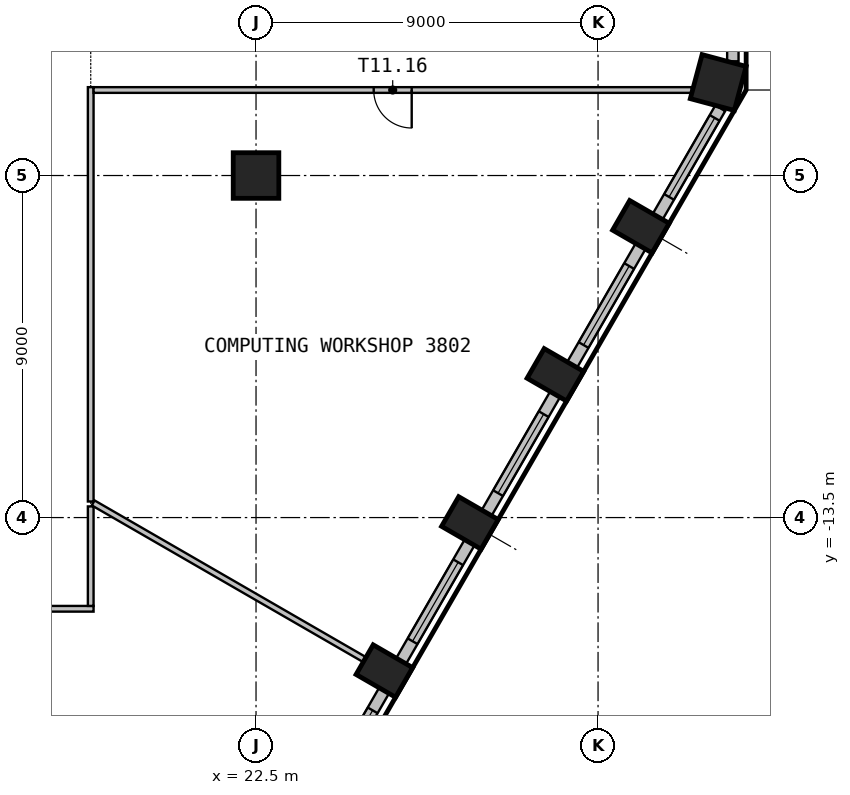
"""IFC4 building model, lengths in metres.
Left out: names, types, materials, properties, quantities, classifications, styles, units other than length and angle.
Written with IfcOpenShell. Run it as: python <this file> out.ifc"""

import sys

from ifc_helpers import new_model, si_unit, direction, frame, frame_2d, origin, origin_2d, place, context, subcontext, project, spatial, rectangle, circle, extrude, element, fill, save


model = new_model("IFC4")
c1 = context("Model", 3, precision=1e-05, world=origin(), true_north=direction((0.0, 1.0)))
c2 = subcontext(c1, "Body", "Model", "MODEL_VIEW")
j1 = project(units=[si_unit("LENGTHUNIT", "METRE"), si_unit("PLANEANGLEUNIT", "RADIAN")], contexts=[c1])
p1 = place(None, origin())
s1 = spatial("IfcSite", under=j1, at=p1, CompositionType="ELEMENT")
p2 = place(p1, origin())
s2 = spatial("IfcBuilding", under=s1, at=p2, CompositionType="ELEMENT")
p3 = place(p2, frame((0.0, 0.0, 156.0)))
s3 = spatial("IfcBuildingStorey", under=s2, at=p3, CompositionType="ELEMENT", Elevation=156.0)
for number, where, z_axis, x_axis in (
    (1, (25.877, -17.539, 0.0), (0.0, 0.0, 1.0), (0.5, 0.866, 0.0)),
    (2, (28.127, -13.641, 0.0), (0.0, 0.0, 1.0), (0.5, 0.866, 0.0)),
    (3, (30.377, -9.744, 0.0), (0.0, 0.0, 1.0), (0.5, 0.866, 0.0)),
    (4, (32.627, -5.847, 0.0), (0.0, 0.0, 1.0), (0.5, 0.866, 0.0)),
):
    element("IfcColumn", number, at=place(p3, frame(where, z_axis=z_axis, x_axis=x_axis)), inside=s3, PredefinedType="COLUMN", context=c2, shape_type="SweptSolid", body=[
        extrude(rectangle(XDim=0.9, YDim=1.2, at=origin_2d()), origin(), (0.0, 0.0, 1.0), 3.575),
    ])
p4 = place(p3, frame((34.662, -2.053, 0.0), z_axis=(0.0, 0.0, 1.0), x_axis=(0.258819045103, 0.965925826289, 0.0)))
e5 = element("IfcColumn", 5, at=p4, inside=s3, PredefinedType="COLUMN", context=c2, shape_type="SweptSolid", body=[
    extrude(rectangle(XDim=1.2, YDim=1.2, at=origin_2d()), origin(), (0.0, 0.0, 1.0), 3.575),
])
p5 = place(p3, frame((22.5, -4.5, 0.0), z_axis=(0.0, 0.0, 1.0), x_axis=(1.0, 0.0, 0.0)))
e6 = element("IfcColumn", 6, at=p5, inside=s3, PredefinedType="COLUMN", context=c2, shape_type="SweptSolid", body=[
    extrude(circle(Radius=0.6, at=origin_2d()), origin(), (0.0, 0.0, 1.0), 3.575),
])
p6 = place(p3, frame((24.069, -21.17, 0.0), z_axis=(0.0, 0.0, 1.0), x_axis=(0.500027802648, 0.866009351323, 0.0)))
e7 = element("IfcWall", 7, at=p6, inside=s3, PredefinedType="SOLIDWALL", context=c2, shape_type="SweptSolid", body=[
    extrude(rectangle(XDim=3.599, YDim=0.3, at=frame_2d((1.799, 0.0))), origin(), (0.0, 0.0, 1.0), 3.575),
])
p7 = place(p6, frame((0.6, 0.0, 0.9)))
e8 = element("IfcOpeningElement", 8, at=p7, cuts=e7, PredefinedType="OPENING", context=c2, shape_type="SweptSolid", body=[
    extrude(rectangle(XDim=2.4, YDim=2.1, at=frame_2d((1.2, 1.05))), frame((0.0, 0.16, 0.0), z_axis=(0.0, -1.0, 0.0), x_axis=(1.0, 0.0, 0.0)), (0.0, 0.0, 1.0), 0.32),
])
p8 = place(p3, frame((26.319, -17.273, 0.0), z_axis=(0.0, 0.0, 1.0), x_axis=(0.500027802648, 0.866009351323, 0.0)))
e9 = element("IfcWall", 9, at=p8, inside=s3, PredefinedType="SOLIDWALL", context=c2, shape_type="SweptSolid", body=[
    extrude(rectangle(XDim=3.599, YDim=0.3, at=frame_2d((1.799, 0.0))), origin(), (0.0, 0.0, 1.0), 3.575),
])
p9 = place(p8, frame((0.6, 0.0, 0.9)))
e10 = element("IfcOpeningElement", 10, at=p9, cuts=e9, PredefinedType="OPENING", context=c2, shape_type="SweptSolid", body=[
    extrude(rectangle(XDim=2.4, YDim=2.1, at=frame_2d((1.2, 1.05))), frame((0.0, 0.16, 0.0), z_axis=(0.0, -1.0, 0.0), x_axis=(1.0, 0.0, 0.0)), (0.0, 0.0, 1.0), 0.32),
])
p10 = place(p3, frame((28.569, -13.376, 0.0), z_axis=(0.0, 0.0, 1.0), x_axis=(0.500027802648, 0.866009351323, 0.0)))
e11 = element("IfcWall", 11, at=p10, inside=s3, PredefinedType="SOLIDWALL", context=c2, shape_type="SweptSolid", body=[
    extrude(rectangle(XDim=3.599, YDim=0.3, at=frame_2d((1.799, 0.0))), origin(), (0.0, 0.0, 1.0), 3.575),
])
p11 = place(p10, frame((0.6, 0.0, 0.9)))
e12 = element("IfcOpeningElement", 12, at=p11, cuts=e11, PredefinedType="OPENING", context=c2, shape_type="SweptSolid", body=[
    extrude(rectangle(XDim=2.4, YDim=2.1, at=frame_2d((1.2, 1.05))), frame((0.0, 0.16, 0.0), z_axis=(0.0, -1.0, 0.0), x_axis=(1.0, 0.0, 0.0)), (0.0, 0.0, 1.0), 0.32),
])
p12 = place(p3, frame((30.819, -9.479, 0.0), z_axis=(0.0, 0.0, 1.0), x_axis=(0.500027802648, 0.866009351323, 0.0)))
e13 = element("IfcWall", 13, at=p12, inside=s3, PredefinedType="SOLIDWALL", context=c2, shape_type="SweptSolid", body=[
    extrude(rectangle(XDim=3.599, YDim=0.3, at=frame_2d((1.799, 0.0))), origin(), (0.0, 0.0, 1.0), 3.575),
])
p13 = place(p12, frame((0.6, 0.0, 0.9)))
e14 = element("IfcOpeningElement", 14, at=p13, cuts=e13, PredefinedType="OPENING", context=c2, shape_type="SweptSolid", body=[
    extrude(rectangle(XDim=2.4, YDim=2.1, at=frame_2d((1.2, 1.05))), frame((0.0, 0.16, 0.0), z_axis=(0.0, -1.0, 0.0), x_axis=(1.0, 0.0, 0.0)), (0.0, 0.0, 1.0), 0.32),
])
p14 = place(p3, frame((33.069, -5.582, 0.0), z_axis=(0.0, 0.0, 1.0), x_axis=(0.499981217486, 0.866036247602, 0.0)))
e15 = element("IfcWall", 15, at=p14, inside=s3, PredefinedType="SOLIDWALL", context=c2, shape_type="SweptSolid", body=[
    extrude(rectangle(XDim=3.294, YDim=0.3, at=frame_2d((1.647, 0.0))), origin(), (0.0, 0.0, 1.0), 3.575),
])
p15 = place(p14, frame((0.6, 0.0, 0.9)))
e16 = element("IfcOpeningElement", 16, at=p15, cuts=e15, PredefinedType="OPENING", context=c2, shape_type="SweptSolid", body=[
    extrude(rectangle(XDim=2.4, YDim=2.1, at=frame_2d((1.2, 1.05))), frame((0.0, 0.16, 0.0), z_axis=(0.0, -1.0, 0.0), x_axis=(1.0, 0.0, 0.0)), (0.0, 0.0, 1.0), 0.32),
])
p16 = place(p3, frame((35.047, -1.495, 0.0), z_axis=(0.0, 0.0, 1.0), x_axis=(0.0, 1.0, 0.0)))
e17 = element("IfcWall", 17, at=p16, inside=s3, PredefinedType="SOLIDWALL", context=c2, shape_type="SweptSolid", body=[
    extrude(rectangle(XDim=2.989, YDim=0.3, at=frame_2d((1.495, 0.0))), origin(), (0.0, 0.0, 1.0), 3.575),
])
p17 = place(p16, frame((0.295, 0.0, 0.9)))
e18 = element("IfcOpeningElement", 18, at=p17, cuts=e17, PredefinedType="OPENING", context=c2, shape_type="SweptSolid", body=[
    extrude(rectangle(XDim=2.4, YDim=2.1, at=frame_2d((1.2, 1.05))), frame((0.0, 0.16, 0.0), z_axis=(0.0, -1.0, 0.0), x_axis=(1.0, 0.0, 0.0)), (0.0, 0.0, 1.0), 0.32),
])
p18 = place(p3, frame((13.5, -15.9, 0.0), z_axis=(0.0, 0.0, 1.0), x_axis=(1.0, 0.0, 0.0)))
e19 = element("IfcWall", 19, at=p18, inside=s3, PredefinedType="PARTITIONING", context=c2, shape_type="SweptSolid", body=[
    extrude(rectangle(XDim=4.725, YDim=0.15, at=frame_2d((2.363, 0.0))), origin(), (0.0, 0.0, 1.0), 3.575),
])
p19 = place(p18, frame((1.863, 0.0, 0.0)))
e20 = element("IfcOpeningElement", 20, at=p19, cuts=e19, PredefinedType="OPENING", context=c2, shape_type="SweptSolid", body=[
    extrude(rectangle(XDim=1.0, YDim=2.1, at=frame_2d((0.5, 1.05))), frame((0.0, 0.085, 0.0), z_axis=(0.0, -1.0, 0.0), x_axis=(1.0, 0.0, 0.0)), (0.0, 0.0, 1.0), 0.17),
])
p20 = place(p3, frame((18.15, -15.825, 0.0), z_axis=(0.0, 0.0, 1.0), x_axis=(0.0, 1.0, 0.0)))
e21 = element("IfcWall", 21, at=p20, inside=s3, PredefinedType="PARTITIONING", context=c2, shape_type="SweptSolid", body=[
    extrude(rectangle(XDim=2.618, YDim=0.15, at=frame_2d((1.309, 0.0))), origin(), (0.0, 0.0, 1.0), 3.575),
])
p21 = place(p3, frame((18.15, -13.077, 0.0), z_axis=(0.0, 0.0, 1.0), x_axis=(0.0, 1.0, 0.0)))
e22 = element("IfcWall", 22, at=p21, inside=s3, PredefinedType="PARTITIONING", context=c2, shape_type="SweptSolid", body=[
    extrude(rectangle(XDim=10.902, YDim=0.15, at=frame_2d((5.451, 0.0))), origin(), (0.0, 0.0, 1.0), 3.575),
])
p22 = place(p3, frame((18.215, -13.115, 0.0), z_axis=(0.0, 0.0, 1.0), x_axis=(0.866039823271, -0.499975023885, 0.0)))
e23 = element("IfcWall", 23, at=p22, inside=s3, PredefinedType="PARTITIONING", context=c2, shape_type="SweptSolid", body=[
    extrude(rectangle(XDim=8.228, YDim=0.15, at=frame_2d((4.114, 0.0))), origin(), (0.0, 0.0, 1.0), 3.575),
])
p23 = place(p3, frame((33.968, -2.25, 0.0), z_axis=(0.0, 0.0, 1.0), x_axis=(-1.0, 0.0, 0.0)))
e24 = element("IfcWall", 24, at=p23, inside=s3, PredefinedType="PARTITIONING", context=c2, shape_type="SweptSolid", body=[
    extrude(rectangle(XDim=15.743, YDim=0.15, at=frame_2d((7.871, 0.0))), origin(), (0.0, 0.0, 1.0), 3.575),
])
p24 = place(p23, frame((7.371, 0.0, 0.0)))
e25 = element("IfcOpeningElement", 25, at=p24, cuts=e24, PredefinedType="OPENING", context=c2, shape_type="SweptSolid", body=[
    extrude(rectangle(XDim=1.0, YDim=2.1, at=frame_2d((0.5, 1.05))), frame((0.0, 0.085, 0.0), z_axis=(0.0, -1.0, 0.0), x_axis=(1.0, 0.0, 0.0)), (0.0, 0.0, 1.0), 0.17),
])
p25 = place(p7, origin())
e26 = element("IfcWindow", 26, at=p25, inside=s3, PartitioningType="SINGLE_PANEL", PredefinedType="WINDOW", context=c2, shape_type="SweptSolid", body=[
    extrude(rectangle(XDim=2.4, YDim=2.1, at=frame_2d((1.2, 1.05))), frame((0.0, 0.03, 0.0), z_axis=(0.0, -1.0, 0.0), x_axis=(1.0, 0.0, 0.0)), (0.0, 0.0, 1.0), 0.06),
])
fill(e8, e26)
p26 = place(p9, origin())
e27 = element("IfcWindow", 27, at=p26, inside=s3, PartitioningType="SINGLE_PANEL", PredefinedType="WINDOW", context=c2, shape_type="SweptSolid", body=[
    extrude(rectangle(XDim=2.4, YDim=2.1, at=frame_2d((1.2, 1.05))), frame((0.0, 0.03, 0.0), z_axis=(0.0, -1.0, 0.0), x_axis=(1.0, 0.0, 0.0)), (0.0, 0.0, 1.0), 0.06),
])
fill(e10, e27)
p27 = place(p11, origin())
e28 = element("IfcWindow", 28, at=p27, inside=s3, PartitioningType="SINGLE_PANEL", PredefinedType="WINDOW", context=c2, shape_type="SweptSolid", body=[
    extrude(rectangle(XDim=2.4, YDim=2.1, at=frame_2d((1.2, 1.05))), frame((0.0, 0.03, 0.0), z_axis=(0.0, -1.0, 0.0), x_axis=(1.0, 0.0, 0.0)), (0.0, 0.0, 1.0), 0.06),
])
fill(e12, e28)
p28 = place(p13, origin())
e29 = element("IfcWindow", 29, at=p28, inside=s3, PartitioningType="SINGLE_PANEL", PredefinedType="WINDOW", context=c2, shape_type="SweptSolid", body=[
    extrude(rectangle(XDim=2.4, YDim=2.1, at=frame_2d((1.2, 1.05))), frame((0.0, 0.03, 0.0), z_axis=(0.0, -1.0, 0.0), x_axis=(1.0, 0.0, 0.0)), (0.0, 0.0, 1.0), 0.06),
])
fill(e14, e29)
p29 = place(p15, origin())
e30 = element("IfcWindow", 30, at=p29, inside=s3, PartitioningType="SINGLE_PANEL", PredefinedType="WINDOW", context=c2, shape_type="SweptSolid", body=[
    extrude(rectangle(XDim=2.4, YDim=2.1, at=frame_2d((1.2, 1.05))), frame((0.0, 0.03, 0.0), z_axis=(0.0, -1.0, 0.0), x_axis=(1.0, 0.0, 0.0)), (0.0, 0.0, 1.0), 0.06),
])
fill(e16, e30)
p30 = place(p24, origin())
e31 = element("IfcDoor", 31, at=p30, inside=s3, OperationType="SINGLE_SWING_RIGHT", PredefinedType="DOOR", context=c2, shape_type="SweptSolid", body=[
    extrude(rectangle(XDim=1.0, YDim=2.1, at=frame_2d((0.5, 1.05))), frame((0.0, 0.025, 0.0), z_axis=(0.0, -1.0, 0.0), x_axis=(1.0, 0.0, 0.0)), (0.0, 0.0, 1.0), 0.05),
])
fill(e25, e31)
save(model, sys.argv[1])
